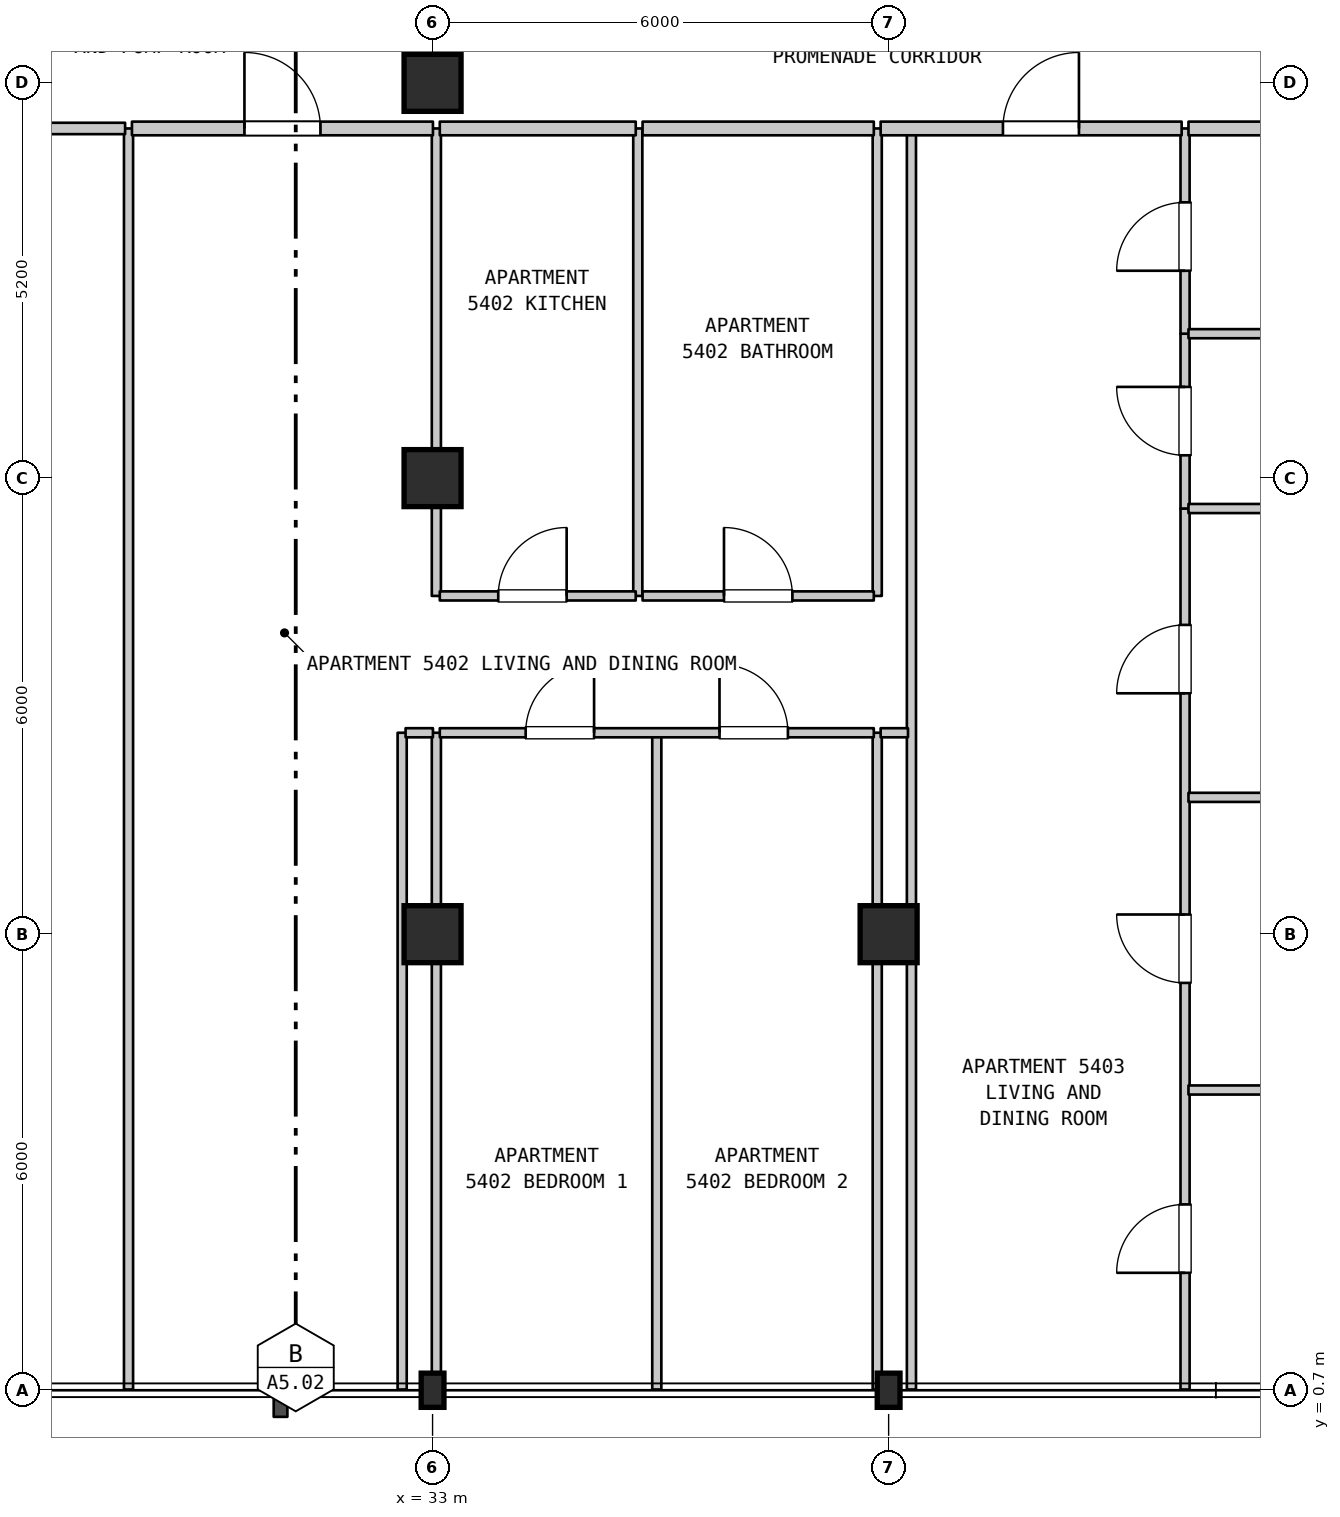
"""IFC4 building model, lengths in metres.
Left out: names, types, materials, properties, quantities, classifications, styles, units other than length and angle.
Written with IfcOpenShell. Run it as: python <this file> out.ifc"""

import sys

from ifc_helpers import new_model, si_unit, direction, frame, frame_2d, origin, origin_2d, place, context, subcontext, project, spatial, rectangle, i_section, extrude, element, fill, save


model = new_model("IFC4")
c1 = context("Model", 3, precision=1e-05, world=origin(), true_north=direction((0.0, 1.0)))
c2 = subcontext(c1, "Body", "Model", "MODEL_VIEW")
j1 = project(units=[si_unit("LENGTHUNIT", "METRE"), si_unit("PLANEANGLEUNIT", "RADIAN")], contexts=[c1])
p1 = place(None, origin())
s1 = spatial("IfcSite", under=j1, at=p1, CompositionType="ELEMENT")
p2 = place(p1, origin())
s2 = spatial("IfcBuilding", under=s1, at=p2, CompositionType="ELEMENT")
p3 = place(p2, frame((0.0, 0.0, 218.0)))
s3 = spatial("IfcBuildingStorey", under=s2, at=p3, CompositionType="ELEMENT", Elevation=218.0)
p4 = place(p3, frame((33.0, 0.7, 0.0), z_axis=(0.0, 0.0, 1.0), x_axis=(1.0, 0.0, 0.0)))
e1 = element("IfcColumn", 1, at=p4, inside=s3, PredefinedType="COLUMN", context=c2, shape_type="SweptSolid", body=[
    extrude(i_section(OverallWidth=0.3, OverallDepth=0.45, WebThickness=0.014, FlangeThickness=0.026, FilletRadius=0.027, at=origin_2d()), origin(), (0.0, 0.0, 1.0), 4.8),
])
for number, where, z_axis, x_axis in (
    (2, (33.0, 6.7, 0.0), (0.0, 0.0, 1.0), (1.0, 0.0, 0.0)),
    (3, (33.0, 12.7, 0.0), (0.0, 0.0, 1.0), (1.0, 0.0, 0.0)),
    (4, (33.0, 17.9, 0.0), (0.0, 0.0, 1.0), (1.0, 0.0, 0.0)),
):
    element("IfcColumn", number, at=place(p3, frame(where, z_axis=z_axis, x_axis=x_axis)), inside=s3, PredefinedType="COLUMN", context=c2, shape_type="SweptSolid", body=[
        extrude(rectangle(XDim=0.75, YDim=0.75, at=origin_2d()), origin(), (0.0, 0.0, 1.0), 4.8),
    ])
p5 = place(p3, frame((39.0, 0.7, 0.0), z_axis=(0.0, 0.0, 1.0), x_axis=(1.0, 0.0, 0.0)))
e5 = element("IfcColumn", 5, at=p5, inside=s3, PredefinedType="COLUMN", context=c2, shape_type="SweptSolid", body=[
    extrude(i_section(OverallWidth=0.3, OverallDepth=0.45, WebThickness=0.014, FlangeThickness=0.026, FilletRadius=0.027, at=origin_2d()), origin(), (0.0, 0.0, 1.0), 4.8),
])
p6 = place(p3, frame((39.0, 6.7, 0.0), z_axis=(0.0, 0.0, 1.0), x_axis=(1.0, 0.0, 0.0)))
e6 = element("IfcColumn", 6, at=p6, inside=s3, PredefinedType="COLUMN", context=c2, shape_type="SweptSolid", body=[
    extrude(rectangle(XDim=0.75, YDim=0.75, at=origin_2d()), origin(), (0.0, 0.0, 1.0), 4.8),
])
p7 = place(p3, frame((29.0, 0.71, 0.0), z_axis=(0.0, 0.0, 1.0), x_axis=(0.0, 1.0, 0.0)))
e7 = element("IfcWall", 7, at=p7, inside=s3, PredefinedType="PARTITIONING", context=c2, shape_type="SweptSolid", body=[
    extrude(rectangle(XDim=16.59, YDim=0.12, at=frame_2d((8.295, 0.0))), origin(), (0.0, 0.0, 1.0), 4.49),
])
p8 = place(p3, frame((32.6, 0.71, 0.0), z_axis=(0.0, 0.0, 1.0), x_axis=(0.0, 1.0, 0.0)))
e8 = element("IfcWall", 8, at=p8, inside=s3, PredefinedType="PARTITIONING", context=c2, shape_type="SweptSolid", body=[
    extrude(rectangle(XDim=8.64, YDim=0.12, at=frame_2d((4.32, 0.0))), origin(), (0.0, 0.0, 1.0), 4.49),
])
p9 = place(p3, frame((33.05, 0.71, 0.0), z_axis=(0.0, 0.0, 1.0), x_axis=(0.0, 1.0, 0.0)))
e9 = element("IfcWall", 9, at=p9, inside=s3, PredefinedType="PARTITIONING", context=c2, shape_type="SweptSolid", body=[
    extrude(rectangle(XDim=8.64, YDim=0.12, at=frame_2d((4.32, 0.0))), origin(), (0.0, 0.0, 1.0), 4.09),
])
p10 = place(p3, frame((33.05, 11.15, 0.0), z_axis=(0.0, 0.0, 1.0), x_axis=(0.0, 1.0, 0.0)))
e10 = element("IfcWall", 10, at=p10, inside=s3, PredefinedType="PARTITIONING", context=c2, shape_type="SweptSolid", body=[
    extrude(rectangle(XDim=6.15, YDim=0.12, at=frame_2d((3.075, 0.0))), origin(), (0.0, 0.0, 1.0), 4.09),
])
p11 = place(p3, frame((35.7, 11.15, 0.0), z_axis=(0.0, 0.0, 1.0), x_axis=(0.0, 1.0, 0.0)))
e11 = element("IfcWall", 11, at=p11, inside=s3, PredefinedType="PARTITIONING", context=c2, shape_type="SweptSolid", body=[
    extrude(rectangle(XDim=6.15, YDim=0.12, at=frame_2d((3.075, 0.0))), origin(), (0.0, 0.0, 1.0), 4.49),
])
for number, where, z_axis, x_axis in (
    (12, (35.95, 0.71, 0.0), (0.0, 0.0, 1.0), (0.0, 1.0, 0.0)),
    (13, (38.85, 0.71, 0.0), (0.0, 0.0, 1.0), (0.0, 1.0, 0.0)),
):
    element("IfcWall", number, at=place(p3, frame(where, z_axis=z_axis, x_axis=x_axis)), inside=s3, PredefinedType="PARTITIONING", context=c2, shape_type="SweptSolid", body=[
        extrude(rectangle(XDim=8.64, YDim=0.12, at=frame_2d((4.32, 0.0))), origin(), (0.0, 0.0, 1.0), 4.49),
    ])
p12 = place(p3, frame((38.85, 11.15, 0.0), z_axis=(0.0, 0.0, 1.0), x_axis=(0.0, 1.0, 0.0)))
e14 = element("IfcWall", 14, at=p12, inside=s3, PredefinedType="PARTITIONING", context=c2, shape_type="SweptSolid", body=[
    extrude(rectangle(XDim=6.15, YDim=0.12, at=frame_2d((3.075, 0.0))), origin(), (0.0, 0.0, 1.0), 4.49),
])
p13 = place(p3, frame((39.3, 0.71, 0.0), z_axis=(0.0, 0.0, 1.0), x_axis=(0.0, 1.0, 0.0)))
e15 = element("IfcWall", 15, at=p13, inside=s3, PredefinedType="PARTITIONING", context=c2, shape_type="SweptSolid", body=[
    extrude(rectangle(XDim=16.59, YDim=0.12, at=frame_2d((8.295, 0.0))), origin(), (0.0, 0.0, 1.0), 4.49),
])
p14 = place(p3, frame((42.9, 0.71, 0.0), z_axis=(0.0, 0.0, 1.0), x_axis=(0.0, 1.0, 0.0)))
e16 = element("IfcWall", 16, at=p14, inside=s3, PredefinedType="PARTITIONING", context=c2, shape_type="SweptSolid", body=[
    extrude(rectangle(XDim=11.59, YDim=0.12, at=frame_2d((5.795, 0.0))), origin(), (0.0, 0.0, 1.0), 4.49),
])
p15 = place(p14, frame((1.535, 0.0, 0.0)))
e17 = element("IfcOpeningElement", 17, at=p15, cuts=e16, PredefinedType="OPENING", context=c2, shape_type="SweptSolid", body=[
    extrude(rectangle(XDim=0.9, YDim=2.15, at=frame_2d((0.45, 1.075))), frame((0.0, 0.07, 0.0), z_axis=(0.0, -1.0, 0.0), x_axis=(1.0, 0.0, 0.0)), (0.0, 0.0, 1.0), 0.14),
])
p16 = place(p14, frame((5.349, 0.0, 0.0)))
e18 = element("IfcOpeningElement", 18, at=p16, cuts=e16, PredefinedType="OPENING", context=c2, shape_type="SweptSolid", body=[
    extrude(rectangle(XDim=0.9, YDim=2.15, at=frame_2d((0.45, 1.075))), frame((0.0, 0.07, 0.0), z_axis=(0.0, -1.0, 0.0), x_axis=(1.0, 0.0, 0.0)), (0.0, 0.0, 1.0), 0.14),
])
p17 = place(p14, frame((9.159, 0.0, 0.0)))
e19 = element("IfcOpeningElement", 19, at=p17, cuts=e16, PredefinedType="OPENING", context=c2, shape_type="SweptSolid", body=[
    extrude(rectangle(XDim=0.9, YDim=2.15, at=frame_2d((0.45, 1.075))), frame((0.0, 0.07, 0.0), z_axis=(0.0, -1.0, 0.0), x_axis=(1.0, 0.0, 0.0)), (0.0, 0.0, 1.0), 0.14),
])
p18 = place(p3, frame((42.9, 12.3, 0.0), z_axis=(0.0, 0.0, 1.0), x_axis=(0.0, 1.0, 0.0)))
e20 = element("IfcWall", 20, at=p18, inside=s3, PredefinedType="PARTITIONING", context=c2, shape_type="SweptSolid", body=[
    extrude(rectangle(XDim=2.3, YDim=0.12, at=frame_2d((1.15, 0.0))), origin(), (0.0, 0.0, 1.0), 4.49),
])
p19 = place(p18, frame((0.7, 0.0, 0.0)))
e21 = element("IfcOpeningElement", 21, at=p19, cuts=e20, PredefinedType="OPENING", context=c2, shape_type="SweptSolid", body=[
    extrude(rectangle(XDim=0.9, YDim=2.15, at=frame_2d((0.45, 1.075))), frame((0.0, 0.07, 0.0), z_axis=(0.0, -1.0, 0.0), x_axis=(1.0, 0.0, 0.0)), (0.0, 0.0, 1.0), 0.14),
])
p20 = place(p3, frame((42.9, 14.6, 0.0), z_axis=(0.0, 0.0, 1.0), x_axis=(0.0, 1.0, 0.0)))
e22 = element("IfcWall", 22, at=p20, inside=s3, PredefinedType="PARTITIONING", context=c2, shape_type="SweptSolid", body=[
    extrude(rectangle(XDim=2.7, YDim=0.12, at=frame_2d((1.35, 0.0))), origin(), (0.0, 0.0, 1.0), 4.49),
])
p21 = place(p20, frame((0.828, 0.0, 0.0)))
e23 = element("IfcOpeningElement", 23, at=p21, cuts=e22, PredefinedType="OPENING", context=c2, shape_type="SweptSolid", body=[
    extrude(rectangle(XDim=0.9, YDim=2.1, at=frame_2d((0.45, 1.05))), frame((0.0, 0.07, 0.0), z_axis=(0.0, -1.0, 0.0), x_axis=(1.0, 0.0, 0.0)), (0.0, 0.0, 1.0), 0.14),
])
for number, where, z_axis, x_axis in (
    (24, (42.945, 4.65, 0.0), (0.0, 0.0, 1.0), (1.0, 0.0, 0.0)),
    (25, (42.945, 8.5, 0.0), (0.0, 0.0, 1.0), (1.0, 0.0, 0.0)),
):
    element("IfcWall", number, at=place(p3, frame(where, z_axis=z_axis, x_axis=x_axis)), inside=s3, PredefinedType="PARTITIONING", context=c2, shape_type="SweptSolid", body=[
        extrude(rectangle(XDim=5.78, YDim=0.12, at=frame_2d((2.89, 0.0))), origin(), (0.0, 0.0, 1.0), 4.49),
    ])
p22 = place(p3, frame((32.645, 9.35, 0.0), z_axis=(0.0, 0.0, 1.0), x_axis=(1.0, 0.0, 0.0)))
e26 = element("IfcWall", 26, at=p22, inside=s3, PredefinedType="PARTITIONING", context=c2, shape_type="SweptSolid", body=[
    extrude(rectangle(XDim=0.36, YDim=0.12, at=frame_2d((0.18, 0.0))), origin(), (0.0, 0.0, 1.0), 4.49),
])
p23 = place(p3, frame((33.095, 9.35, 0.0), z_axis=(0.0, 0.0, 1.0), x_axis=(1.0, 0.0, 0.0)))
e27 = element("IfcWall", 27, at=p23, inside=s3, PredefinedType="PARTITIONING", context=c2, shape_type="SweptSolid", body=[
    extrude(rectangle(XDim=5.71, YDim=0.12, at=frame_2d((2.855, 0.0))), origin(), (0.0, 0.0, 1.0), 4.49),
])
p24 = place(p23, frame((1.13, 0.0, 0.0)))
e28 = element("IfcOpeningElement", 28, at=p24, cuts=e27, PredefinedType="OPENING", context=c2, shape_type="SweptSolid", body=[
    extrude(rectangle(XDim=0.9, YDim=2.15, at=frame_2d((0.45, 1.075))), frame((0.0, 0.07, 0.0), z_axis=(0.0, -1.0, 0.0), x_axis=(1.0, 0.0, 0.0)), (0.0, 0.0, 1.0), 0.14),
])
p25 = place(p23, frame((3.68, 0.0, 0.0)))
e29 = element("IfcOpeningElement", 29, at=p25, cuts=e27, PredefinedType="OPENING", context=c2, shape_type="SweptSolid", body=[
    extrude(rectangle(XDim=0.9, YDim=2.15, at=frame_2d((0.45, 1.075))), frame((0.0, 0.07, 0.0), z_axis=(0.0, -1.0, 0.0), x_axis=(1.0, 0.0, 0.0)), (0.0, 0.0, 1.0), 0.14),
])
p26 = place(p3, frame((38.895, 9.35, 0.0), z_axis=(0.0, 0.0, 1.0), x_axis=(1.0, 0.0, 0.0)))
e30 = element("IfcWall", 30, at=p26, inside=s3, PredefinedType="PARTITIONING", context=c2, shape_type="SweptSolid", body=[
    extrude(rectangle(XDim=0.36, YDim=0.12, at=frame_2d((0.18, 0.0))), origin(), (0.0, 0.0, 1.0), 4.49),
])
p27 = place(p3, frame((33.095, 11.15, 0.0), z_axis=(0.0, 0.0, 1.0), x_axis=(1.0, 0.0, 0.0)))
e31 = element("IfcWall", 31, at=p27, inside=s3, PredefinedType="PARTITIONING", context=c2, shape_type="SweptSolid", body=[
    extrude(rectangle(XDim=2.578, YDim=0.12, at=frame_2d((1.289, 0.0))), origin(), (0.0, 0.0, 1.0), 4.49),
])
p28 = place(p27, frame((0.769, 0.0, 0.0)))
e32 = element("IfcOpeningElement", 32, at=p28, cuts=e31, PredefinedType="OPENING", context=c2, shape_type="SweptSolid", body=[
    extrude(rectangle(XDim=0.9, YDim=2.15, at=frame_2d((0.45, 1.075))), frame((0.0, 0.07, 0.0), z_axis=(0.0, -1.0, 0.0), x_axis=(1.0, 0.0, 0.0)), (0.0, 0.0, 1.0), 0.14),
])
p29 = place(p3, frame((35.763, 11.15, 0.0), z_axis=(0.0, 0.0, 1.0), x_axis=(1.0, 0.0, 0.0)))
e33 = element("IfcWall", 33, at=p29, inside=s3, PredefinedType="PARTITIONING", context=c2, shape_type="SweptSolid", body=[
    extrude(rectangle(XDim=3.042, YDim=0.12, at=frame_2d((1.521, 0.0))), origin(), (0.0, 0.0, 1.0), 4.49),
])
p30 = place(p29, frame((1.071, 0.0, 0.0)))
e34 = element("IfcOpeningElement", 34, at=p30, cuts=e33, PredefinedType="OPENING", context=c2, shape_type="SweptSolid", body=[
    extrude(rectangle(XDim=0.9, YDim=2.1, at=frame_2d((0.45, 1.05))), frame((0.0, 0.07, 0.0), z_axis=(0.0, -1.0, 0.0), x_axis=(1.0, 0.0, 0.0)), (0.0, 0.0, 1.0), 0.14),
])
for number, where, z_axis, x_axis in (
    (35, (42.945, 12.3, 0.0), (0.0, 0.0, 1.0), (1.0, 0.0, 0.0)),
    (36, (42.945, 14.6, 0.0), (0.0, 0.0, 1.0), (1.0, 0.0, 0.0)),
):
    element("IfcWall", number, at=place(p3, frame(where, z_axis=z_axis, x_axis=x_axis)), inside=s3, PredefinedType="PARTITIONING", context=c2, shape_type="SweptSolid", body=[
        extrude(rectangle(XDim=5.78, YDim=0.12, at=frame_2d((2.89, 0.0))), origin(), (0.0, 0.0, 1.0), 4.49),
    ])
p31 = place(p3, frame((24.245, 17.3, 0.0), z_axis=(0.0, 0.0, 1.0), x_axis=(1.0, 0.0, 0.0)))
e37 = element("IfcWall", 37, at=p31, inside=s3, PredefinedType="STANDARD", context=c2, shape_type="SweptSolid", body=[
    extrude(rectangle(XDim=4.71, YDim=0.15, at=frame_2d((2.355, 0.0))), origin(), (0.0, 0.0, 1.0), 4.49),
])
p32 = place(p31, frame((1.782, 0.0, 0.0)))
e38 = element("IfcOpeningElement", 38, at=p32, cuts=e37, PredefinedType="OPENING", context=c2, shape_type="SweptSolid", body=[
    extrude(rectangle(XDim=1.0, YDim=2.15, at=frame_2d((0.5, 1.075))), frame((0.0, 0.085, 0.0), z_axis=(0.0, -1.0, 0.0), x_axis=(1.0, 0.0, 0.0)), (0.0, 0.0, 1.0), 0.17),
])
p33 = place(p3, frame((29.045, 17.3, 0.0), z_axis=(0.0, 0.0, 1.0), x_axis=(1.0, 0.0, 0.0)))
e39 = element("IfcWall", 39, at=p33, inside=s3, PredefinedType="STANDARD", context=c2, shape_type="SweptSolid", body=[
    extrude(rectangle(XDim=3.96, YDim=0.18, at=frame_2d((1.98, 0.0))), origin(), (0.0, 0.0, 1.0), 4.49),
])
p34 = place(p33, frame((1.48, 0.0, 0.0)))
e40 = element("IfcOpeningElement", 40, at=p34, cuts=e39, PredefinedType="OPENING", context=c2, shape_type="SweptSolid", body=[
    extrude(rectangle(XDim=1.0, YDim=2.15, at=frame_2d((0.5, 1.075))), frame((0.0, 0.1, 0.0), z_axis=(0.0, -1.0, 0.0), x_axis=(1.0, 0.0, 0.0)), (0.0, 0.0, 1.0), 0.2),
])
p35 = place(p3, frame((33.095, 17.3, 0.0), z_axis=(0.0, 0.0, 1.0), x_axis=(1.0, 0.0, 0.0)))
e41 = element("IfcWall", 41, at=p35, inside=s3, PredefinedType="STANDARD", context=c2, shape_type="SweptSolid", body=[
    extrude(rectangle(XDim=2.578, YDim=0.18, at=frame_2d((1.289, 0.0))), origin(), (0.0, 0.0, 1.0), 4.49),
])
p36 = place(p3, frame((35.763, 17.3, 0.0), z_axis=(0.0, 0.0, 1.0), x_axis=(1.0, 0.0, 0.0)))
e42 = element("IfcWall", 42, at=p36, inside=s3, PredefinedType="STANDARD", context=c2, shape_type="SweptSolid", body=[
    extrude(rectangle(XDim=3.042, YDim=0.18, at=frame_2d((1.521, 0.0))), origin(), (0.0, 0.0, 1.0), 4.49),
])
p37 = place(p3, frame((38.895, 17.3, 0.0), z_axis=(0.0, 0.0, 1.0), x_axis=(1.0, 0.0, 0.0)))
e43 = element("IfcWall", 43, at=p37, inside=s3, PredefinedType="STANDARD", context=c2, shape_type="SweptSolid", body=[
    extrude(rectangle(XDim=3.96, YDim=0.18, at=frame_2d((1.98, 0.0))), origin(), (0.0, 0.0, 1.0), 4.49),
])
p38 = place(p37, frame((1.609, 0.0, 0.0)))
e44 = element("IfcOpeningElement", 44, at=p38, cuts=e43, PredefinedType="OPENING", context=c2, shape_type="SweptSolid", body=[
    extrude(rectangle(XDim=1.0, YDim=2.15, at=frame_2d((0.5, 1.075))), frame((0.0, 0.1, 0.0), z_axis=(0.0, -1.0, 0.0), x_axis=(1.0, 0.0, 0.0)), (0.0, 0.0, 1.0), 0.2),
])
p39 = place(p3, frame((42.945, 17.3, 0.0), z_axis=(0.0, 0.0, 1.0), x_axis=(1.0, 0.0, 0.0)))
e45 = element("IfcWall", 45, at=p39, inside=s3, PredefinedType="STANDARD", context=c2, shape_type="SweptSolid", body=[
    extrude(rectangle(XDim=5.78, YDim=0.18, at=frame_2d((2.89, 0.0))), origin(), (0.0, 0.0, 1.0), 4.49),
])
p40 = place(p15, origin())
e46 = element("IfcDoor", 46, at=p40, inside=s3, OperationType="SINGLE_SWING_LEFT", PredefinedType="DOOR", context=c2, shape_type="SweptSolid", body=[
    extrude(rectangle(XDim=0.9, YDim=2.15, at=frame_2d((0.45, 1.075))), frame((0.0, 0.025, 0.0), z_axis=(0.0, -1.0, 0.0), x_axis=(1.0, 0.0, 0.0)), (0.0, 0.0, 1.0), 0.05),
])
fill(e17, e46)
p41 = place(p16, origin())
e47 = element("IfcDoor", 47, at=p41, inside=s3, OperationType="SINGLE_SWING_RIGHT", PredefinedType="DOOR", context=c2, shape_type="SweptSolid", body=[
    extrude(rectangle(XDim=0.9, YDim=2.15, at=frame_2d((0.45, 1.075))), frame((0.0, 0.025, 0.0), z_axis=(0.0, -1.0, 0.0), x_axis=(1.0, 0.0, 0.0)), (0.0, 0.0, 1.0), 0.05),
])
fill(e18, e47)
p42 = place(p17, origin())
e48 = element("IfcDoor", 48, at=p42, inside=s3, OperationType="SINGLE_SWING_LEFT", PredefinedType="DOOR", context=c2, shape_type="SweptSolid", body=[
    extrude(rectangle(XDim=0.9, YDim=2.15, at=frame_2d((0.45, 1.075))), frame((0.0, 0.025, 0.0), z_axis=(0.0, -1.0, 0.0), x_axis=(1.0, 0.0, 0.0)), (0.0, 0.0, 1.0), 0.05),
])
fill(e19, e48)
p43 = place(p19, origin())
e49 = element("IfcDoor", 49, at=p43, inside=s3, OperationType="SINGLE_SWING_RIGHT", PredefinedType="DOOR", context=c2, shape_type="SweptSolid", body=[
    extrude(rectangle(XDim=0.9, YDim=2.15, at=frame_2d((0.45, 1.075))), frame((0.0, 0.025, 0.0), z_axis=(0.0, -1.0, 0.0), x_axis=(1.0, 0.0, 0.0)), (0.0, 0.0, 1.0), 0.05),
])
fill(e21, e49)
p44 = place(p21, origin())
e50 = element("IfcDoor", 50, at=p44, inside=s3, OperationType="SINGLE_SWING_LEFT", PredefinedType="DOOR", context=c2, shape_type="SweptSolid", body=[
    extrude(rectangle(XDim=0.9, YDim=2.1, at=frame_2d((0.45, 1.05))), frame((0.0, 0.025, 0.0), z_axis=(0.0, -1.0, 0.0), x_axis=(1.0, 0.0, 0.0)), (0.0, 0.0, 1.0), 0.05),
])
fill(e23, e50)
p45 = place(p24, origin())
e51 = element("IfcDoor", 51, at=p45, inside=s3, OperationType="SINGLE_SWING_RIGHT", PredefinedType="DOOR", context=c2, shape_type="SweptSolid", body=[
    extrude(rectangle(XDim=0.9, YDim=2.15, at=frame_2d((0.45, 1.075))), frame((0.0, 0.025, 0.0), z_axis=(0.0, -1.0, 0.0), x_axis=(1.0, 0.0, 0.0)), (0.0, 0.0, 1.0), 0.05),
])
fill(e28, e51)
p46 = place(p25, origin())
e52 = element("IfcDoor", 52, at=p46, inside=s3, OperationType="SINGLE_SWING_LEFT", PredefinedType="DOOR", context=c2, shape_type="SweptSolid", body=[
    extrude(rectangle(XDim=0.9, YDim=2.15, at=frame_2d((0.45, 1.075))), frame((0.0, 0.025, 0.0), z_axis=(0.0, -1.0, 0.0), x_axis=(1.0, 0.0, 0.0)), (0.0, 0.0, 1.0), 0.05),
])
fill(e29, e52)
p47 = place(p28, origin())
e53 = element("IfcDoor", 53, at=p47, inside=s3, OperationType="SINGLE_SWING_RIGHT", PredefinedType="DOOR", context=c2, shape_type="SweptSolid", body=[
    extrude(rectangle(XDim=0.9, YDim=2.15, at=frame_2d((0.45, 1.075))), frame((0.0, 0.025, 0.0), z_axis=(0.0, -1.0, 0.0), x_axis=(1.0, 0.0, 0.0)), (0.0, 0.0, 1.0), 0.05),
])
fill(e32, e53)
p48 = place(p30, origin())
e54 = element("IfcDoor", 54, at=p48, inside=s3, OperationType="SINGLE_SWING_LEFT", PredefinedType="DOOR", context=c2, shape_type="SweptSolid", body=[
    extrude(rectangle(XDim=0.9, YDim=2.1, at=frame_2d((0.45, 1.05))), frame((0.0, 0.025, 0.0), z_axis=(0.0, -1.0, 0.0), x_axis=(1.0, 0.0, 0.0)), (0.0, 0.0, 1.0), 0.05),
])
fill(e34, e54)
p49 = place(p34, origin())
e55 = element("IfcDoor", 55, at=p49, inside=s3, OperationType="SINGLE_SWING_LEFT", PredefinedType="DOOR", context=c2, shape_type="SweptSolid", body=[
    extrude(rectangle(XDim=1.0, YDim=2.15, at=frame_2d((0.5, 1.075))), frame((0.0, 0.025, 0.0), z_axis=(0.0, -1.0, 0.0), x_axis=(1.0, 0.0, 0.0)), (0.0, 0.0, 1.0), 0.05),
])
fill(e40, e55)
p50 = place(p38, origin())
e56 = element("IfcDoor", 56, at=p50, inside=s3, OperationType="SINGLE_SWING_RIGHT", PredefinedType="DOOR", context=c2, shape_type="SweptSolid", body=[
    extrude(rectangle(XDim=1.0, YDim=2.15, at=frame_2d((0.5, 1.075))), frame((0.0, 0.025, 0.0), z_axis=(0.0, -1.0, 0.0), x_axis=(1.0, 0.0, 0.0)), (0.0, 0.0, 1.0), 0.05),
])
fill(e44, e56)
save(model, sys.argv[1])
